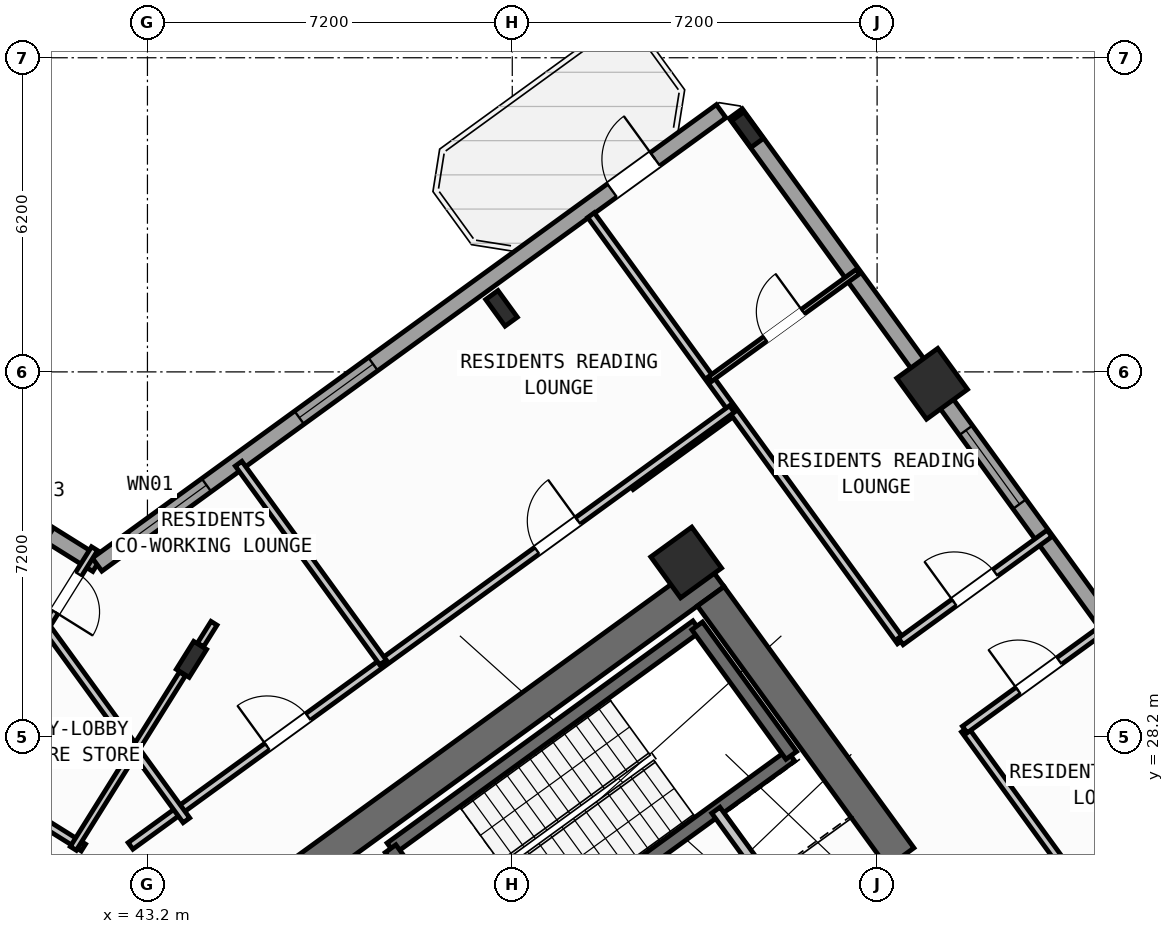
"""IFC4 building model, lengths in metres.
Left out: names, types, materials, properties, quantities, classifications, styles, units other than length and angle.
Written with IfcOpenShell. Run it as: python <this file> out.ifc"""

import sys

from ifc_helpers import new_model, si_unit, direction, frame, frame_2d, origin, origin_2d, place, context, subcontext, project, spatial, rectangle, hollow_rectangle, i_section, extrude, source, transform, mapped, element, fill, save


model = new_model("IFC4")
c1 = context("Model", 3, precision=1e-05, world=origin(), true_north=direction((0.0, 1.0)))
c2 = subcontext(c1, "Body", "Model", "MODEL_VIEW")
j1 = project(units=[si_unit("LENGTHUNIT", "METRE"), si_unit("PLANEANGLEUNIT", "RADIAN")], contexts=[c1])
p1 = place(None, origin())
s1 = spatial("IfcSite", under=j1, at=p1, CompositionType="ELEMENT")
p2 = place(p1, origin())
s2 = spatial("IfcBuilding", under=s1, at=p2, CompositionType="ELEMENT")
p3 = place(p2, frame((0.0, 0.0, 71.7)))
s3 = spatial("IfcBuildingStorey", under=s2, at=p3, CompositionType="ELEMENT", Elevation=71.7)
p4 = place(p3, frame((44.325, 24.113, 0.0), z_axis=(0.0, 0.0, 1.0), x_axis=(0.809012664862, 0.58779121131, 0.0)))
e1 = element("IfcWall", 1, at=p4, inside=s3, PredefinedType="SHEAR", context=c2, shape_type="SweptSolid", body=[
    extrude(rectangle(XDim=12.44, YDim=0.65, at=frame_2d((6.22, 0.0))), origin(), (0.0, 0.0, 1.0), 4.52),
])
p5 = place(p3, frame((58.064, 25.813, 0.0), z_axis=(0.0, 0.0, 1.0), x_axis=(-0.58777996584, 0.809020835181, 0.0)))
e2 = element("IfcWall", 2, at=p5, inside=s3, PredefinedType="SHEAR", context=c2, shape_type="SweptSolid", body=[
    extrude(rectangle(XDim=6.375, YDim=0.65, at=frame_2d((3.188, 0.0))), origin(), (0.0, 0.0, 1.0), 4.52),
])
m1 = source(origin(), c2, "Body", "SweptSolid", [
    extrude(i_section(OverallWidth=0.3, OverallDepth=0.65, WebThickness=0.016, FlangeThickness=0.031, at=origin_2d()), origin(), (0.0, 0.0, 1.0), 4.8),
])
p6 = place(p3, frame((44.068, 29.726, 0.0), z_axis=(0.0, 0.0, 1.0), x_axis=(-0.848048096156, 0.529919264233, 0.0)))
e3 = element("IfcColumn", 3, at=p6, inside=s3, PredefinedType="COLUMN", context=c2, shape_type="MappedRepresentation", body=[
    mapped(m1, transform((0.0, 0.0, 0.0), scale=1.0)),
])
m2 = source(origin(), c2, "Body", "SweptSolid", [
    extrude(hollow_rectangle(XDim=1.0, YDim=1.0, WallThickness=0.04, at=origin_2d()), origin(), (0.0, 0.0, 1.0), 4.8),
])
p7 = place(p3, frame((53.832, 31.638, 0.0), z_axis=(0.0, 0.0, 1.0), x_axis=(0.809016994375, 0.587785252292, 0.0)))
e4 = element("IfcColumn", 4, at=p7, inside=s3, PredefinedType="COLUMN", context=c2, shape_type="MappedRepresentation", body=[
    mapped(m2, transform((0.0, 0.0, 0.0), scale=1.0)),
])
p8 = place(p3, frame((50.188, 36.654, 0.0), z_axis=(0.0, 0.0, 1.0), x_axis=(0.809016994375, 0.587785252292, 0.0)))
e5 = element("IfcColumn", 5, at=p8, inside=s3, PredefinedType="COLUMN", context=c2, shape_type="MappedRepresentation", body=[
    mapped(m1, transform((0.0, 0.0, 0.0), scale=1.0)),
])
p9 = place(p3, frame((58.686, 35.165, 0.0), z_axis=(0.0, 0.0, 1.0), x_axis=(0.809016994375, 0.587785252292, 0.0)))
e6 = element("IfcColumn", 6, at=p9, inside=s3, PredefinedType="COLUMN", context=c2, shape_type="MappedRepresentation", body=[
    mapped(m2, transform((0.0, 0.0, 0.0), scale=1.0)),
])
p10 = place(p3, frame((55.042, 40.181, 0.0), z_axis=(0.0, 0.0, 1.0), x_axis=(0.809016994375, 0.587785252292, 0.0)))
e7 = element("IfcColumn", 7, at=p10, inside=s3, PredefinedType="COLUMN", context=c2, shape_type="MappedRepresentation", body=[
    mapped(m1, transform((0.0, 0.0, 0.0), scale=1.0)),
])
p11 = place(p3, frame((17.424, 47.083, 0.0), z_axis=(0.0, 0.0, 1.0), x_axis=(0.848049927979, -0.529916332693, 0.0)))
e8 = element("IfcWall", 8, at=p11, inside=s3, PredefinedType="STANDARD", context=c2, shape_type="SweptSolid", body=[
    extrude(rectangle(XDim=29.223, YDim=0.32, at=frame_2d((14.612, 0.0))), origin(), (0.0, 0.0, 1.0), 4.52),
])
p12 = place(p11, frame((3.339, 0.0, 0.0)))
e9 = element("IfcOpeningElement", 9, at=p12, cuts=e8, PredefinedType="OPENING", context=c2, shape_type="SweptSolid", body=[
    extrude(rectangle(XDim=1.05, YDim=2.15, at=frame_2d((0.525, 1.075))), frame((0.0, 0.17, 0.0), z_axis=(0.0, -1.0, 0.0), x_axis=(1.0, 0.0, 0.0)), (0.0, 0.0, 1.0), 0.34),
])
p13 = place(p11, frame((8.194, 0.0, 0.75)))
e10 = element("IfcOpeningElement", 10, at=p13, cuts=e8, PredefinedType="OPENING", context=c2, shape_type="SweptSolid", body=[
    extrude(rectangle(XDim=2.4, YDim=1.6, at=frame_2d((1.2, 0.8))), frame((0.0, 0.17, 0.0), z_axis=(0.0, -1.0, 0.0), x_axis=(1.0, 0.0, 0.0)), (0.0, 0.0, 1.0), 0.34),
])
p14 = place(p11, frame((22.226, 0.0, 0.85)))
e11 = element("IfcOpeningElement", 11, at=p14, cuts=e8, PredefinedType="OPENING", context=c2, shape_type="SweptSolid", body=[
    extrude(rectangle(XDim=1.8, YDim=1.5, at=frame_2d((0.9, 0.75))), frame((0.0, 0.17, 0.0), z_axis=(0.0, -1.0, 0.0), x_axis=(1.0, 0.0, 0.0)), (0.0, 0.0, 1.0), 0.34),
])
p15 = place(p11, frame((26.934, 0.0, 0.95)))
e12 = element("IfcOpeningElement", 12, at=p15, cuts=e8, PredefinedType="OPENING", context=c2, shape_type="SweptSolid", body=[
    extrude(rectangle(XDim=1.2, YDim=1.4, at=frame_2d((0.6, 0.7))), frame((0.0, 0.17, 0.0), z_axis=(0.0, -1.0, 0.0), x_axis=(1.0, 0.0, 0.0)), (0.0, 0.0, 1.0), 0.34),
])
p16 = place(p11, frame((14.636, 0.0, 1.0)))
e13 = element("IfcOpeningElement", 13, at=p16, cuts=e8, PredefinedType="OPENING", context=c2, shape_type="SweptSolid", body=[
    extrude(rectangle(XDim=0.9, YDim=1.25, at=frame_2d((0.45, 0.625))), frame((0.0, 0.17, 0.0), z_axis=(0.0, -1.0, 0.0), x_axis=(1.0, 0.0, 0.0)), (0.0, 0.0, 1.0), 0.34),
])
p17 = place(p3, frame((42.207, 31.597, 0.0), z_axis=(0.0, 0.0, 1.0), x_axis=(0.809020333377, 0.587780656523, 0.0)))
e14 = element("IfcWall", 14, at=p17, inside=s3, PredefinedType="STANDARD", context=c2, shape_type="SweptSolid", body=[
    extrude(rectangle(XDim=15.223, YDim=0.32, at=frame_2d((7.611, 0.0))), origin(), (0.0, 0.0, 1.0), 4.52),
])
p18 = place(p17, frame((12.562, 0.0, 0.0)))
e15 = element("IfcOpeningElement", 15, at=p18, cuts=e14, PredefinedType="OPENING", context=c2, shape_type="SweptSolid", body=[
    extrude(rectangle(XDim=1.05, YDim=2.15, at=frame_2d((0.525, 1.075))), frame((0.0, 0.17, 0.0), z_axis=(0.0, -1.0, 0.0), x_axis=(1.0, 0.0, 0.0)), (0.0, 0.0, 1.0), 0.34),
])
p19 = place(p17, frame((0.868, 0.0, 0.85)))
e16 = element("IfcOpeningElement", 16, at=p19, cuts=e14, PredefinedType="OPENING", context=c2, shape_type="SweptSolid", body=[
    extrude(rectangle(XDim=1.8, YDim=1.5, at=frame_2d((0.9, 0.75))), frame((0.0, 0.17, 0.0), z_axis=(0.0, -1.0, 0.0), x_axis=(1.0, 0.0, 0.0)), (0.0, 0.0, 1.0), 0.34),
])
p20 = place(p17, frame((4.932, 0.0, 0.85)))
e17 = element("IfcOpeningElement", 17, at=p20, cuts=e14, PredefinedType="OPENING", context=c2, shape_type="SweptSolid", body=[
    extrude(rectangle(XDim=1.8, YDim=1.5, at=frame_2d((0.9, 0.75))), frame((0.0, 0.17, 0.0), z_axis=(0.0, -1.0, 0.0), x_axis=(1.0, 0.0, 0.0)), (0.0, 0.0, 1.0), 0.34),
])
p21 = place(p3, frame((54.81, 40.5, 0.0), z_axis=(0.0, 0.0, 1.0), x_axis=(0.587783625747, -0.809018176127, 0.0)))
e18 = element("IfcWall", 18, at=p21, inside=s3, PredefinedType="STANDARD", context=c2, shape_type="SweptSolid", body=[
    extrude(rectangle(XDim=21.587, YDim=0.32, at=frame_2d((10.794, 0.0))), origin(), (0.0, 0.0, 1.0), 3.895),
])
p22 = place(p21, frame((7.729, 0.0, 0.85)))
e19 = element("IfcOpeningElement", 19, at=p22, cuts=e18, PredefinedType="OPENING", context=c2, shape_type="SweptSolid", body=[
    extrude(rectangle(XDim=1.8, YDim=1.5, at=frame_2d((0.9, 0.75))), frame((0.0, 0.17, 0.0), z_axis=(0.0, -1.0, 0.0), x_axis=(1.0, 0.0, 0.0)), (0.0, 0.0, 1.0), 0.34),
])
p23 = place(p21, frame((15.292, 0.0, 0.85)))
e20 = element("IfcOpeningElement", 20, at=p23, cuts=e18, PredefinedType="OPENING", context=c2, shape_type="SweptSolid", body=[
    extrude(rectangle(XDim=1.8, YDim=1.5, at=frame_2d((0.9, 0.75))), frame((0.0, 0.17, 0.0), z_axis=(0.0, -1.0, 0.0), x_axis=(1.0, 0.0, 0.0)), (0.0, 0.0, 1.0), 0.34),
])
p24 = place(p21, frame((18.897, 0.0, 0.95)))
e21 = element("IfcOpeningElement", 21, at=p24, cuts=e18, PredefinedType="OPENING", context=c2, shape_type="SweptSolid", body=[
    extrude(rectangle(XDim=1.2, YDim=1.4, at=frame_2d((0.6, 0.7))), frame((0.0, 0.17, 0.0), z_axis=(0.0, -1.0, 0.0), x_axis=(1.0, 0.0, 0.0)), (0.0, 0.0, 1.0), 0.34),
])
p25 = place(p3, frame((48.006, 25.996, 0.0), z_axis=(0.0, 0.0, 1.0), x_axis=(0.80901903764, 0.587782439969, 0.0)))
e22 = element("IfcWall", 22, at=p25, inside=s3, PredefinedType="SHEAR", context=c2, shape_type="SweptSolid", body=[
    extrude(rectangle(XDim=7.46, YDim=0.26, at=frame_2d((3.73, 0.0))), origin(), (0.0, 0.0, 1.0), 4.52),
])
p26 = place(p3, frame((49.863, 23.44, 0.0), z_axis=(0.0, 0.0, 1.0), x_axis=(0.809003474932, 0.587803859759, 0.0)))
e23 = element("IfcWall", 23, at=p26, inside=s3, PredefinedType="SHEAR", context=c2, shape_type="SweptSolid", body=[
    extrude(rectangle(XDim=7.46, YDim=0.26, at=frame_2d((3.73, 0.0))), origin(), (0.0, 0.0, 1.0), 4.52),
])
p27 = place(p26, frame((0.36, 0.0, 0.0)))
e24 = element("IfcOpeningElement", 24, at=p27, cuts=e23, PredefinedType="OPENING", context=c2, shape_type="SweptSolid", body=[
    extrude(rectangle(XDim=0.86, YDim=2.05, at=frame_2d((0.43, 1.025))), frame((0.0, 0.14, 0.0), z_axis=(0.0, -1.0, 0.0), x_axis=(1.0, 0.0, 0.0)), (0.0, 0.0, 1.0), 0.28),
])
p28 = place(p3, frame((49.855, 23.434, 0.0), z_axis=(0.0, 0.0, 1.0), x_axis=(-0.58776738483, 0.809029975545, 0.0)))
e25 = element("IfcWall", 25, at=p28, inside=s3, PredefinedType="SHEAR", context=c2, shape_type="SweptSolid", body=[
    extrude(rectangle(XDim=3.16, YDim=0.26, at=frame_2d((1.58, 0.0))), origin(), (0.0, 0.0, 1.0), 4.52),
])
p29 = place(p3, frame((55.906, 27.831, 0.0), z_axis=(0.0, 0.0, 1.0), x_axis=(-0.587804123638, 0.809003283204, 0.0)))
e26 = element("IfcWall", 26, at=p29, inside=s3, PredefinedType="SHEAR", context=c2, shape_type="SweptSolid", body=[
    extrude(rectangle(XDim=3.16, YDim=0.26, at=frame_2d((1.58, 0.0))), origin(), (0.0, 0.0, 1.0), 4.52),
])
p30 = place(p3, frame((56.111, 24.419, 0.0), z_axis=(0.0, 0.0, 1.0), x_axis=(-0.58777848983, 0.809021907548, 0.0)))
e27 = element("IfcWall", 27, at=p30, inside=s3, PredefinedType="STANDARD", context=c2, shape_type="SweptSolid", body=[
    extrude(rectangle(XDim=2.88, YDim=0.2, at=frame_2d((1.44, 0.0))), origin(), (0.0, 0.0, 1.0), 4.51),
])
p31 = place(p3, frame((41.936, 26.012, 0.0), z_axis=(0.0, 0.0, 1.0), x_axis=(-0.848051154596, 0.529914369676, 0.0)))
e28 = element("IfcWall", 28, at=p31, inside=s3, PredefinedType="PARTITIONING", context=c2, shape_type="SweptSolid", body=[
    extrude(rectangle(XDim=15.57, YDim=0.16, at=frame_2d((7.785, 0.0))), origin(), (0.0, 0.0, 1.0), 4.51),
])
p32 = place(p31, frame((4.1, 0.0, 0.0)))
e29 = element("IfcOpeningElement", 29, at=p32, cuts=e28, PredefinedType="OPENING", context=c2, shape_type="SweptSolid", body=[
    extrude(rectangle(XDim=0.96, YDim=2.08, at=frame_2d((0.48, 1.04))), frame((0.0, 0.09, 0.0), z_axis=(0.0, -1.0, 0.0), x_axis=(1.0, 0.0, 0.0)), (0.0, 0.0, 1.0), 0.18),
])
p33 = place(p31, frame((8.2, 0.0, 0.0)))
e30 = element("IfcOpeningElement", 30, at=p33, cuts=e28, PredefinedType="OPENING", context=c2, shape_type="SweptSolid", body=[
    extrude(rectangle(XDim=1.7, YDim=2.2, at=frame_2d((0.85, 1.1))), frame((0.0, 0.09, 0.0), z_axis=(0.0, -1.0, 0.0), x_axis=(1.0, 0.0, 0.0)), (0.0, 0.0, 1.0), 0.18),
])
p34 = place(p3, frame((42.156, 31.912, 0.0), z_axis=(0.0, 0.0, 1.0), x_axis=(-0.529943141103, -0.848033175765, 0.0)))
e31 = element("IfcWall", 31, at=p34, inside=s3, PredefinedType="PLUMBINGWALL", context=c2, shape_type="SweptSolid", body=[
    extrude(rectangle(XDim=2.753, YDim=0.14, at=frame_2d((1.376, 0.0))), origin(), (0.0, 0.0, 1.0), 4.005),
])
p35 = place(p34, frame((0.593, 0.0, 0.0)))
e32 = element("IfcOpeningElement", 32, at=p35, cuts=e31, PredefinedType="OPENING", context=c2, shape_type="SweptSolid", body=[
    extrude(rectangle(XDim=0.88, YDim=2.08, at=frame_2d((0.44, 1.04))), frame((0.0, 0.08, 0.0), z_axis=(0.0, -1.0, 0.0), x_axis=(1.0, 0.0, 0.0)), (0.0, 0.0, 1.0), 0.16),
])
p36 = place(p3, frame((44.514, 30.439, 0.0), z_axis=(0.0, 0.0, 1.0), x_axis=(-0.529824479439, -0.848107316905, 0.0)))
e33 = element("IfcWall", 33, at=p36, inside=s3, PredefinedType="PLUMBINGWALL", context=c2, shape_type="SweptSolid", body=[
    extrude(rectangle(XDim=0.503, YDim=0.14, at=frame_2d((0.251, 0.0))), origin(), (0.0, 0.0, 1.0), 4.51),
])
p37 = place(p3, frame((43.89, 29.44, 0.0), z_axis=(0.0, 0.0, 1.0), x_axis=(-0.529928721319, -0.84804218664, 0.0)))
e34 = element("IfcWall", 34, at=p37, inside=s3, PredefinedType="PLUMBINGWALL", context=c2, shape_type="SweptSolid", body=[
    extrude(rectangle(XDim=4.063, YDim=0.14, at=frame_2d((2.031, 0.0))), origin(), (0.0, 0.0, 1.0), 3.895),
])
p38 = place(p3, frame((52.739, 33.143, 0.0), z_axis=(0.0, 0.0, 1.0), x_axis=(0.809000999347, 0.58780726693, 0.0)))
e35 = element("IfcWall", 35, at=p38, inside=s3, PredefinedType="PARTITIONING", context=c2, shape_type="SweptSolid", body=[
    extrude(rectangle(XDim=2.51, YDim=0.16, at=frame_2d((1.255, 0.0))), origin(), (0.0, 0.0, 1.0), 4.51),
])
p39 = place(p3, frame((64.709, 20.938, 0.0), z_axis=(0.0, 0.0, 1.0), x_axis=(-0.587776590479, 0.80902328748, 0.0)))
e36 = element("IfcWall", 36, at=p39, inside=s3, PredefinedType="PARTITIONING", context=c2, shape_type="SweptSolid", body=[
    extrude(rectangle(XDim=9.15, YDim=0.16, at=frame_2d((4.575, 0.0))), origin(), (0.0, 0.0, 1.0), 4.51),
])
p40 = place(p3, frame((58.067, 30.08, 0.0), z_axis=(0.0, 0.0, 1.0), x_axis=(-0.587787785243, 0.809015154073, 0.0)))
e37 = element("IfcWall", 37, at=p40, inside=s3, PredefinedType="PARTITIONING", context=c2, shape_type="SweptSolid", body=[
    extrude(rectangle(XDim=10.4, YDim=0.16, at=frame_2d((5.2, 0.0))), origin(), (0.0, 0.0, 1.0), 4.51),
])
p41 = place(p3, frame((59.331, 28.341, 0.0), z_axis=(0.0, 0.0, 1.0), x_axis=(0.809003564202, 0.587803736896, 0.0)))
e38 = element("IfcWall", 38, at=p41, inside=s3, PredefinedType="PARTITIONING", context=c2, shape_type="SweptSolid", body=[
    extrude(rectangle(XDim=3.63, YDim=0.16, at=frame_2d((1.815, 0.0))), origin(), (0.0, 0.0, 1.0), 4.51),
])
p42 = place(p41, frame((1.305, 0.0, 0.0)))
e39 = element("IfcOpeningElement", 39, at=p42, cuts=e38, PredefinedType="OPENING", context=c2, shape_type="SweptSolid", body=[
    extrude(rectangle(XDim=1.0, YDim=2.1, at=frame_2d((0.5, 1.05))), frame((0.0, 0.09, 0.0), z_axis=(0.0, -1.0, 0.0), x_axis=(1.0, 0.0, 0.0)), (0.0, 0.0, 1.0), 0.18),
])
p43 = place(p3, frame((58.067, 30.08, 0.0), z_axis=(0.0, 0.0, 1.0), x_axis=(0.809012309495, 0.587791700422, 0.0)))
e40 = element("IfcWall", 40, at=p43, inside=s3, PredefinedType="PARTITIONING", context=c2, shape_type="SweptSolid", body=[
    extrude(rectangle(XDim=3.63, YDim=0.16, at=frame_2d((1.815, 0.0))), origin(), (0.0, 0.0, 1.0), 4.51),
])
p44 = place(p43, frame((1.305, 0.0, 0.0)))
e41 = element("IfcOpeningElement", 41, at=p44, cuts=e40, PredefinedType="OPENING", context=c2, shape_type="SweptSolid", body=[
    extrude(rectangle(XDim=1.0, YDim=2.1, at=frame_2d((0.5, 1.05))), frame((0.0, 0.09, 0.0), z_axis=(0.0, -1.0, 0.0), x_axis=(1.0, 0.0, 0.0)), (0.0, 0.0, 1.0), 0.18),
])
p45 = place(p3, frame((54.304, 35.259, 0.0), z_axis=(0.0, 0.0, 1.0), x_axis=(0.809005039917, 0.58780170584, 0.0)))
e42 = element("IfcWall", 42, at=p45, inside=s3, PredefinedType="PARTITIONING", context=c2, shape_type="SweptSolid", body=[
    extrude(rectangle(XDim=3.61, YDim=0.11, at=frame_2d((1.805, 0.0))), origin(), (0.0, 0.0, 1.0), 4.51),
])
p46 = place(p45, frame((1.345, 0.0, 0.0)))
e43 = element("IfcOpeningElement", 43, at=p46, cuts=e42, PredefinedType="OPENING", context=c2, shape_type="SweptSolid", body=[
    extrude(rectangle(XDim=0.92, YDim=2.08, at=frame_2d((0.46, 1.04))), frame((0.0, 0.065, 0.0), z_axis=(0.0, -1.0, 0.0), x_axis=(1.0, 0.0, 0.0)), (0.0, 0.0, 1.0), 0.13),
])
p47 = place(p3, frame((42.866, 26.044, 0.0), z_axis=(0.0, 0.0, 1.0), x_axis=(0.809020254154, 0.587780765566, 0.0)))
e44 = element("IfcWall", 44, at=p47, inside=s3, PredefinedType="PARTITIONING", context=c2, shape_type="SweptSolid", body=[
    extrude(rectangle(XDim=14.67, YDim=0.16, at=frame_2d((7.335, 0.0))), origin(), (0.0, 0.0, 1.0), 4.51),
])
p48 = place(p47, frame((3.335, 0.0, 0.0)))
e45 = element("IfcOpeningElement", 45, at=p48, cuts=e44, PredefinedType="OPENING", context=c2, shape_type="SweptSolid", body=[
    extrude(rectangle(XDim=1.0, YDim=2.1, at=frame_2d((0.5, 1.05))), frame((0.0, 0.09, 0.0), z_axis=(0.0, -1.0, 0.0), x_axis=(1.0, 0.0, 0.0)), (0.0, 0.0, 1.0), 0.18),
])
p49 = place(p47, frame((9.915, 0.0, 0.0)))
e46 = element("IfcOpeningElement", 46, at=p49, cuts=e44, PredefinedType="OPENING", context=c2, shape_type="SweptSolid", body=[
    extrude(rectangle(XDim=1.0, YDim=2.1, at=frame_2d((0.5, 1.05))), frame((0.0, 0.09, 0.0), z_axis=(0.0, -1.0, 0.0), x_axis=(1.0, 0.0, 0.0)), (0.0, 0.0, 1.0), 0.18),
])
p50 = place(p3, frame((43.969, 26.55, 0.0), z_axis=(0.0, 0.0, 1.0), x_axis=(-0.587776919386, 0.80902304852, 0.0)))
e47 = element("IfcWall", 47, at=p50, inside=s3, PredefinedType="PARTITIONING", context=c2, shape_type="SweptSolid", body=[
    extrude(rectangle(XDim=5.48, YDim=0.16, at=frame_2d((2.74, 0.0))), origin(), (0.0, 0.0, 1.0), 4.51),
])
p51 = place(p3, frame((47.849, 29.665, 0.0), z_axis=(0.0, 0.0, 1.0), x_axis=(-0.587785532001, 0.809016791155, 0.0)))
e48 = element("IfcWall", 48, at=p51, inside=s3, PredefinedType="PARTITIONING", context=c2, shape_type="SweptSolid", body=[
    extrude(rectangle(XDim=4.85, YDim=0.16, at=frame_2d((2.425, 0.0))), origin(), (0.0, 0.0, 1.0), 4.51),
])
m3 = source(origin(), c2, "Body", "SweptSolid", [
    extrude(rectangle(XDim=1.05, YDim=2.15, at=frame_2d((0.525, 1.075))), frame((0.0, 0.025, 0.0), z_axis=(0.0, -1.0, 0.0), x_axis=(1.0, 0.0, 0.0)), (0.0, 0.0, 1.0), 0.05),
])
p52 = place(p18, origin())
e49 = element("IfcDoor", 49, at=p52, inside=s3, OperationType="SINGLE_SWING_RIGHT", PredefinedType="DOOR", context=c2, shape_type="MappedRepresentation", body=[
    mapped(m3, transform((0.0, 0.0, 0.0), scale=1.0)),
])
fill(e15, e49)
m4 = source(origin(), c2, "Body", "SweptSolid", [
    extrude(rectangle(XDim=1.8, YDim=1.5, at=frame_2d((0.9, 0.75))), frame((0.0, 0.03, 0.0), z_axis=(0.0, -1.0, 0.0), x_axis=(1.0, 0.0, 0.0)), (0.0, 0.0, 1.0), 0.06),
])
p53 = place(p19, origin())
e50 = element("IfcWindow", 50, at=p53, inside=s3, PartitioningType="SINGLE_PANEL", PredefinedType="WINDOW", context=c2, shape_type="MappedRepresentation", body=[
    mapped(m4, transform((0.0, 0.0, 0.0), scale=1.0)),
])
fill(e16, e50)
p54 = place(p20, origin())
e51 = element("IfcWindow", 51, at=p54, inside=s3, PartitioningType="SINGLE_PANEL", PredefinedType="WINDOW", context=c2, shape_type="MappedRepresentation", body=[
    mapped(m4, transform((0.0, 0.0, 0.0), scale=1.0)),
])
fill(e17, e51)
p55 = place(p22, origin())
e52 = element("IfcWindow", 52, at=p55, inside=s3, PartitioningType="SINGLE_PANEL", PredefinedType="WINDOW", context=c2, shape_type="MappedRepresentation", body=[
    mapped(m4, transform((0.0, 0.0, 0.0), scale=1.0)),
])
fill(e19, e52)
m5 = source(origin(), c2, "Body", "SweptSolid", [
    extrude(rectangle(XDim=0.88, YDim=2.08, at=frame_2d((0.44, 1.04))), frame((0.0, 0.025, 0.0), z_axis=(0.0, -1.0, 0.0), x_axis=(1.0, 0.0, 0.0)), (0.0, 0.0, 1.0), 0.05),
])
p56 = place(p35, origin())
e53 = element("IfcDoor", 53, at=p56, inside=s3, OperationType="SINGLE_SWING_RIGHT", PredefinedType="DOOR", context=c2, shape_type="MappedRepresentation", body=[
    mapped(m5, transform((0.0, 0.0, 0.0), scale=1.0)),
])
fill(e32, e53)
m6 = source(origin(), c2, "Body", "SweptSolid", [
    extrude(rectangle(XDim=1.0, YDim=2.1, at=frame_2d((0.5, 1.05))), frame((0.0, 0.025, 0.0), z_axis=(0.0, -1.0, 0.0), x_axis=(1.0, 0.0, 0.0)), (0.0, 0.0, 1.0), 0.05),
])
p57 = place(p44, origin())
e54 = element("IfcDoor", 54, at=p57, inside=s3, OperationType="SINGLE_SWING_LEFT", PredefinedType="DOOR", context=c2, shape_type="MappedRepresentation", body=[
    mapped(m6, transform((0.0, 0.0, 0.0), scale=1.0)),
])
fill(e41, e54)
m7 = source(origin(), c2, "Body", "SweptSolid", [
    extrude(rectangle(XDim=0.92, YDim=2.08, at=frame_2d((0.46, 1.04))), frame((0.0, 0.025, 0.0), z_axis=(0.0, -1.0, 0.0), x_axis=(1.0, 0.0, 0.0)), (0.0, 0.0, 1.0), 0.05),
])
p58 = place(p46, origin())
e55 = element("IfcDoor", 55, at=p58, inside=s3, OperationType="SINGLE_SWING_RIGHT", PredefinedType="DOOR", context=c2, shape_type="MappedRepresentation", body=[
    mapped(m7, transform((0.0, 0.0, 0.0), scale=1.0)),
])
fill(e43, e55)
p59 = place(p42, origin())
e56 = element("IfcDoor", 56, at=p59, inside=s3, OperationType="SINGLE_SWING_LEFT", PredefinedType="DOOR", context=c2, shape_type="MappedRepresentation", body=[
    mapped(m6, transform((0.0, 0.0, 0.0), scale=1.0)),
])
fill(e39, e56)
p60 = place(p48, origin())
e57 = element("IfcDoor", 57, at=p60, inside=s3, OperationType="SINGLE_SWING_LEFT", PredefinedType="DOOR", context=c2, shape_type="MappedRepresentation", body=[
    mapped(m6, transform((0.0, 0.0, 0.0), scale=1.0)),
])
fill(e45, e57)
p61 = place(p49, origin())
e58 = element("IfcDoor", 58, at=p61, inside=s3, OperationType="SINGLE_SWING_RIGHT", PredefinedType="DOOR", context=c2, shape_type="MappedRepresentation", body=[
    mapped(m6, transform((0.0, 0.0, 0.0), scale=1.0)),
])
fill(e46, e58)
save(model, sys.argv[1])
